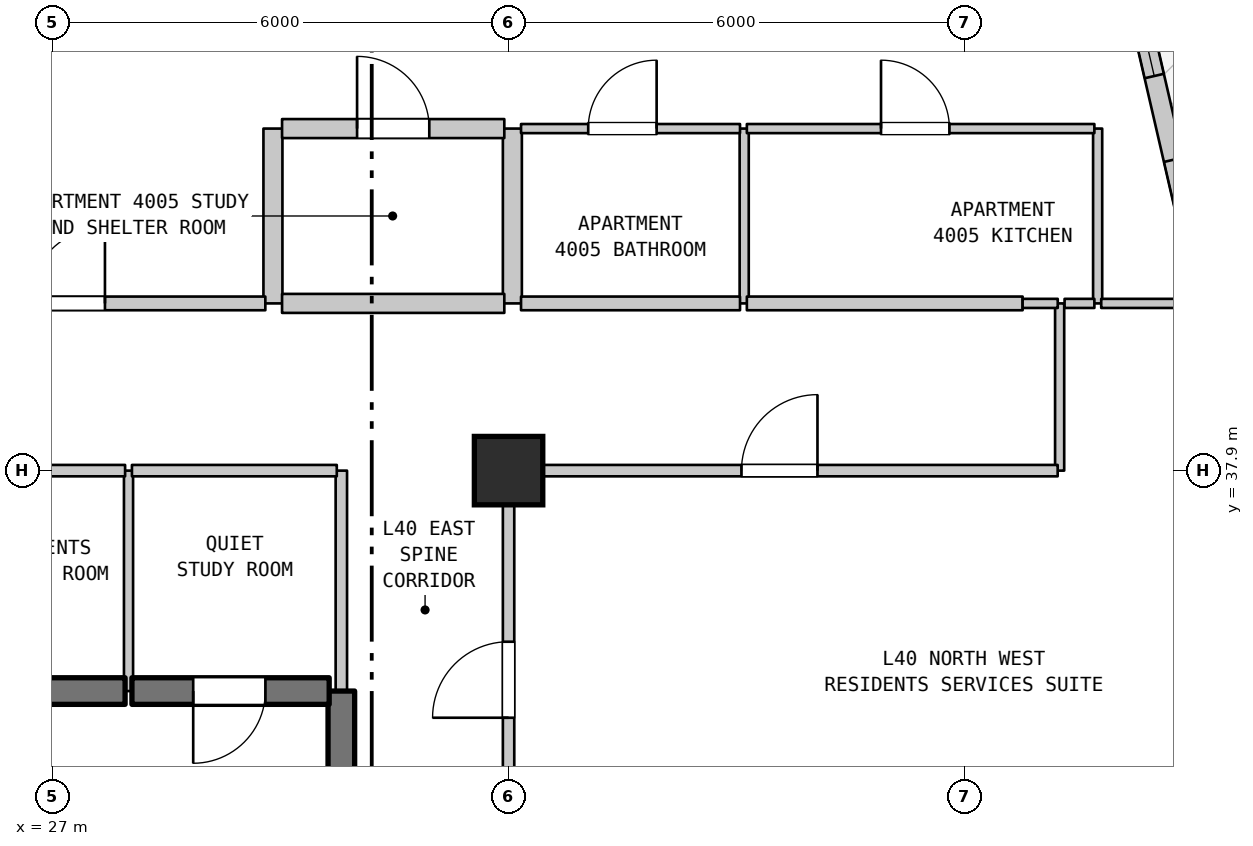
"""IFC4 building model, lengths in metres.
Left out: names, types, materials, properties, quantities, classifications, styles, units other than length and angle.
Written with IfcOpenShell. Run it as: python <this file> out.ifc"""

import sys

from ifc_helpers import new_model, si_unit, direction, frame, frame_2d, origin, origin_2d, place, context, subcontext, project, spatial, rectangle, extrude, element, fill, save


model = new_model("IFC4")
c1 = context("Model", 3, precision=1e-05, world=origin(), true_north=direction((0.0, 1.0)))
c2 = subcontext(c1, "Body", "Model", "MODEL_VIEW")
j1 = project(units=[si_unit("LENGTHUNIT", "METRE"), si_unit("PLANEANGLEUNIT", "RADIAN")], contexts=[c1])
p1 = place(None, origin())
s1 = spatial("IfcSite", under=j1, at=p1, CompositionType="ELEMENT")
p2 = place(p1, origin())
s2 = spatial("IfcBuilding", under=s1, at=p2, CompositionType="ELEMENT")
p3 = place(p2, frame((0.0, 0.0, 164.6)))
s3 = spatial("IfcBuildingStorey", under=s2, at=p3, CompositionType="ELEMENT", Elevation=164.6)
p4 = place(p3, frame((33.0, 37.9, 0.0), z_axis=(0.0, 0.0, 1.0), x_axis=(1.0, 0.0, 0.0)))
e1 = element("IfcColumn", 1, at=p4, inside=s3, PredefinedType="COLUMN", context=c2, shape_type="SweptSolid", body=[
    extrude(rectangle(XDim=0.9, YDim=0.9, at=origin_2d()), origin(), (0.0, 0.0, 1.0), 4.5),
])
p5 = place(p3, frame((39.358, 52.35, 0.0), z_axis=(0.0, 0.0, 1.0), x_axis=(0.224849558511, -0.974393491377, 0.0)))
e2 = element("IfcWall", 2, at=p5, inside=s3, PredefinedType="STANDARD", context=c2, shape_type="SweptSolid", body=[
    extrude(rectangle(XDim=25.093, YDim=0.26, at=frame_2d((12.546, 0.0))), origin(), (0.0, 0.0, 1.0), 4.19),
])
p6 = place(p5, frame((16.689, 0.0, 0.0)))
e3 = element("IfcOpeningElement", 3, at=p6, cuts=e2, PredefinedType="OPENING", context=c2, shape_type="SweptSolid", body=[
    extrude(rectangle(XDim=1.4, YDim=2.2, at=frame_2d((0.7, 1.1))), frame((0.0, 0.14, 0.0), z_axis=(0.0, -1.0, 0.0), x_axis=(1.0, 0.0, 0.0)), (0.0, 0.0, 1.0), 0.28),
])
p7 = place(p5, frame((0.915, 0.0, 0.9)))
e4 = element("IfcOpeningElement", 4, at=p7, cuts=e2, PredefinedType="OPENING", context=c2, shape_type="SweptSolid", body=[
    extrude(rectangle(XDim=1.4, YDim=1.85, at=frame_2d((0.7, 0.925))), frame((0.0, 0.14, 0.0), z_axis=(0.0, -1.0, 0.0), x_axis=(1.0, 0.0, 0.0)), (0.0, 0.0, 1.0), 0.28),
])
p8 = place(p5, frame((3.344, 0.0, 0.9)))
e5 = element("IfcOpeningElement", 5, at=p8, cuts=e2, PredefinedType="OPENING", context=c2, shape_type="SweptSolid", body=[
    extrude(rectangle(XDim=1.3, YDim=1.9, at=frame_2d((0.65, 0.95))), frame((0.0, 0.14, 0.0), z_axis=(0.0, -1.0, 0.0), x_axis=(1.0, 0.0, 0.0)), (0.0, 0.0, 1.0), 0.28),
])
p9 = place(p5, frame((5.323, 0.0, 0.9)))
e6 = element("IfcOpeningElement", 6, at=p9, cuts=e2, PredefinedType="OPENING", context=c2, shape_type="SweptSolid", body=[
    extrude(rectangle(XDim=1.4, YDim=1.85, at=frame_2d((0.7, 0.925))), frame((0.0, 0.14, 0.0), z_axis=(0.0, -1.0, 0.0), x_axis=(1.0, 0.0, 0.0)), (0.0, 0.0, 1.0), 0.28),
])
p10 = place(p5, frame((8.202, 0.0, 0.9)))
e7 = element("IfcOpeningElement", 7, at=p10, cuts=e2, PredefinedType="OPENING", context=c2, shape_type="SweptSolid", body=[
    extrude(rectangle(XDim=1.3, YDim=1.9, at=frame_2d((0.65, 0.95))), frame((0.0, 0.14, 0.0), z_axis=(0.0, -1.0, 0.0), x_axis=(1.0, 0.0, 0.0)), (0.0, 0.0, 1.0), 0.28),
])
p11 = place(p5, frame((10.632, 0.0, 0.9)))
e8 = element("IfcOpeningElement", 8, at=p11, cuts=e2, PredefinedType="OPENING", context=c2, shape_type="SweptSolid", body=[
    extrude(rectangle(XDim=1.4, YDim=1.85, at=frame_2d((0.7, 0.925))), frame((0.0, 0.14, 0.0), z_axis=(0.0, -1.0, 0.0), x_axis=(1.0, 0.0, 0.0)), (0.0, 0.0, 1.0), 0.28),
])
p12 = place(p5, frame((13.061, 0.0, 0.9)))
e9 = element("IfcOpeningElement", 9, at=p12, cuts=e2, PredefinedType="OPENING", context=c2, shape_type="SweptSolid", body=[
    extrude(rectangle(XDim=1.3, YDim=1.9, at=frame_2d((0.65, 0.95))), frame((0.0, 0.14, 0.0), z_axis=(0.0, -1.0, 0.0), x_axis=(1.0, 0.0, 0.0)), (0.0, 0.0, 1.0), 0.28),
])
p13 = place(p5, frame((18.369, 0.0, 0.9)))
e10 = element("IfcOpeningElement", 10, at=p13, cuts=e2, PredefinedType="OPENING", context=c2, shape_type="SweptSolid", body=[
    extrude(rectangle(XDim=1.4, YDim=1.85, at=frame_2d((0.7, 0.925))), frame((0.0, 0.14, 0.0), z_axis=(0.0, -1.0, 0.0), x_axis=(1.0, 0.0, 0.0)), (0.0, 0.0, 1.0), 0.28),
])
p14 = place(p5, frame((20.799, 0.0, 0.9)))
e11 = element("IfcOpeningElement", 11, at=p14, cuts=e2, PredefinedType="OPENING", context=c2, shape_type="SweptSolid", body=[
    extrude(rectangle(XDim=1.3, YDim=1.9, at=frame_2d((0.65, 0.95))), frame((0.0, 0.14, 0.0), z_axis=(0.0, -1.0, 0.0), x_axis=(1.0, 0.0, 0.0)), (0.0, 0.0, 1.0), 0.28),
])
p15 = place(p3, frame((28.0, 35.0, 0.0), z_axis=(0.0, 0.0, 1.0), x_axis=(0.0, 1.0, 0.0)))
e12 = element("IfcWall", 12, at=p15, inside=s3, PredefinedType="PARTITIONING", context=c2, shape_type="SweptSolid", body=[
    extrude(rectangle(XDim=2.9, YDim=0.12, at=frame_2d((1.45, 0.0))), origin(), (0.0, 0.0, 1.0), 4.19),
])
p16 = place(p3, frame((29.9, 40.1, 0.0), z_axis=(0.0, 0.0, 1.0), x_axis=(0.0, 1.0, 0.0)))
e13 = element("IfcWall", 13, at=p16, inside=s3, PredefinedType="STANDARD", context=c2, shape_type="SweptSolid", body=[
    extrude(rectangle(XDim=2.3, YDim=0.25, at=frame_2d((1.15, 0.0))), origin(), (0.0, 0.0, 1.0), 4.19),
])
p17 = place(p3, frame((30.8, 31.5, 0.0), z_axis=(0.0, 0.0, 1.0), x_axis=(0.0, 1.0, 0.0)))
e14 = element("IfcWall", 14, at=p17, inside=s3, PredefinedType="SHEAR", context=c2, shape_type="SweptSolid", body=[
    extrude(rectangle(XDim=3.5, YDim=0.35, at=frame_2d((1.75, 0.0))), origin(), (0.0, 0.0, 1.0), 4.19),
])
p18 = place(p17, frame((1.15, 0.0, 0.0)))
e15 = element("IfcOpeningElement", 15, at=p18, cuts=e14, PredefinedType="OPENING", context=c2, shape_type="SweptSolid", body=[
    extrude(rectangle(XDim=1.2, YDim=2.2, at=frame_2d((0.6, 1.1))), frame((0.0, 0.185, 0.0), z_axis=(0.0, -1.0, 0.0), x_axis=(1.0, 0.0, 0.0)), (0.0, 0.0, 1.0), 0.37),
])
p19 = place(p3, frame((30.8, 35.0, 0.0), z_axis=(0.0, 0.0, 1.0), x_axis=(0.0, 1.0, 0.0)))
e16 = element("IfcWall", 16, at=p19, inside=s3, PredefinedType="STANDARD", context=c2, shape_type="SweptSolid", body=[
    extrude(rectangle(XDim=2.9, YDim=0.15, at=frame_2d((1.45, 0.0))), origin(), (0.0, 0.0, 1.0), 4.19),
])
p20 = place(p3, frame((33.0, 32.54, 0.0), z_axis=(0.0, 0.0, 1.0), x_axis=(0.0, 1.0, 0.0)))
e17 = element("IfcWall", 17, at=p20, inside=s3, PredefinedType="STANDARD", context=c2, shape_type="SweptSolid", body=[
    extrude(rectangle(XDim=5.36, YDim=0.15, at=frame_2d((2.68, 0.0))), origin(), (0.0, 0.0, 1.0), 3.69),
])
p21 = place(p20, frame((2.109, 0.0, 0.0)))
e18 = element("IfcOpeningElement", 18, at=p21, cuts=e17, PredefinedType="OPENING", context=c2, shape_type="SweptSolid", body=[
    extrude(rectangle(XDim=1.0, YDim=2.15, at=frame_2d((0.5, 1.075))), frame((0.0, 0.085, 0.0), z_axis=(0.0, -1.0, 0.0), x_axis=(1.0, 0.0, 0.0)), (0.0, 0.0, 1.0), 0.17),
])
p22 = place(p3, frame((33.05, 40.1, 0.0), z_axis=(0.0, 0.0, 1.0), x_axis=(0.0, 1.0, 0.0)))
e19 = element("IfcWall", 19, at=p22, inside=s3, PredefinedType="STANDARD", context=c2, shape_type="SweptSolid", body=[
    extrude(rectangle(XDim=2.3, YDim=0.25, at=frame_2d((1.15, 0.0))), origin(), (0.0, 0.0, 1.0), 3.59),
])
p23 = place(p3, frame((36.1, 40.1, 0.0), z_axis=(0.0, 0.0, 1.0), x_axis=(0.0, 1.0, 0.0)))
e20 = element("IfcWall", 20, at=p23, inside=s3, PredefinedType="PARTITIONING", context=c2, shape_type="SweptSolid", body=[
    extrude(rectangle(XDim=2.3, YDim=0.12, at=frame_2d((1.15, 0.0))), origin(), (0.0, 0.0, 1.0), 4.19),
])
p24 = place(p3, frame((40.25, 37.9, 0.0), z_axis=(0.0, 0.0, 1.0), x_axis=(0.0, 1.0, 0.0)))
e21 = element("IfcWall", 21, at=p24, inside=s3, PredefinedType="PARTITIONING", context=c2, shape_type="SweptSolid", body=[
    extrude(rectangle(XDim=2.2, YDim=0.12, at=frame_2d((1.1, 0.0))), origin(), (0.0, 0.0, 1.0), 4.19),
])
p25 = place(p3, frame((40.75, 40.1, 0.0), z_axis=(0.0, 0.0, 1.0), x_axis=(0.0, 1.0, 0.0)))
e22 = element("IfcWall", 22, at=p25, inside=s3, PredefinedType="PARTITIONING", context=c2, shape_type="SweptSolid", body=[
    extrude(rectangle(XDim=2.3, YDim=0.12, at=frame_2d((1.15, 0.0))), origin(), (0.0, 0.0, 1.0), 4.19),
])
p26 = place(p3, frame((23.96, 35.0, 0.0), z_axis=(0.0, 0.0, 1.0), x_axis=(1.0, 0.0, 0.0)))
e23 = element("IfcWall", 23, at=p26, inside=s3, PredefinedType="SHEAR", context=c2, shape_type="SweptSolid", body=[
    extrude(rectangle(XDim=3.995, YDim=0.35, at=frame_2d((1.998, 0.0))), origin(), (0.0, 0.0, 1.0), 4.19),
])
p27 = place(p26, frame((1.393, 0.0, 0.0)))
e24 = element("IfcOpeningElement", 24, at=p27, cuts=e23, PredefinedType="OPENING", context=c2, shape_type="SweptSolid", body=[
    extrude(rectangle(XDim=0.95, YDim=2.15, at=frame_2d((0.475, 1.075))), frame((0.0, 0.185, 0.0), z_axis=(0.0, -1.0, 0.0), x_axis=(1.0, 0.0, 0.0)), (0.0, 0.0, 1.0), 0.37),
])
p28 = place(p3, frame((28.045, 35.0, 0.0), z_axis=(0.0, 0.0, 1.0), x_axis=(1.0, 0.0, 0.0)))
e25 = element("IfcWall", 25, at=p28, inside=s3, PredefinedType="SHEAR", context=c2, shape_type="SweptSolid", body=[
    extrude(rectangle(XDim=2.595, YDim=0.35, at=frame_2d((1.297, 0.0))), origin(), (0.0, 0.0, 1.0), 4.19),
])
p29 = place(p28, frame((0.806, 0.0, 0.0)))
e26 = element("IfcOpeningElement", 26, at=p29, cuts=e25, PredefinedType="OPENING", context=c2, shape_type="SweptSolid", body=[
    extrude(rectangle(XDim=0.95, YDim=2.15, at=frame_2d((0.475, 1.075))), frame((0.0, 0.185, 0.0), z_axis=(0.0, -1.0, 0.0), x_axis=(1.0, 0.0, 0.0)), (0.0, 0.0, 1.0), 0.37),
])
p30 = place(p3, frame((23.96, 37.9, 0.0), z_axis=(0.0, 0.0, 1.0), x_axis=(1.0, 0.0, 0.0)))
e27 = element("IfcWall", 27, at=p30, inside=s3, PredefinedType="STANDARD", context=c2, shape_type="SweptSolid", body=[
    extrude(rectangle(XDim=3.995, YDim=0.15, at=frame_2d((1.998, 0.0))), origin(), (0.0, 0.0, 1.0), 3.69),
])
p31 = place(p3, frame((28.045, 37.9, 0.0), z_axis=(0.0, 0.0, 1.0), x_axis=(1.0, 0.0, 0.0)))
e28 = element("IfcWall", 28, at=p31, inside=s3, PredefinedType="STANDARD", context=c2, shape_type="SweptSolid", body=[
    extrude(rectangle(XDim=2.695, YDim=0.15, at=frame_2d((1.348, 0.0))), origin(), (0.0, 0.0, 1.0), 3.69),
])
p32 = place(p3, frame((33.06, 37.9, 0.0), z_axis=(0.0, 0.0, 1.0), x_axis=(1.0, 0.0, 0.0)))
e29 = element("IfcWall", 29, at=p32, inside=s3, PredefinedType="STANDARD", context=c2, shape_type="SweptSolid", body=[
    extrude(rectangle(XDim=7.164, YDim=0.15, at=frame_2d((3.582, 0.0))), origin(), (0.0, 0.0, 1.0), 4.19),
])
p33 = place(p32, frame((3.004, 0.0, 0.0)))
e30 = element("IfcOpeningElement", 30, at=p33, cuts=e29, PredefinedType="OPENING", context=c2, shape_type="SweptSolid", body=[
    extrude(rectangle(XDim=1.0, YDim=2.15, at=frame_2d((0.5, 1.075))), frame((0.0, 0.085, 0.0), z_axis=(0.0, -1.0, 0.0), x_axis=(1.0, 0.0, 0.0)), (0.0, 0.0, 1.0), 0.17),
])
p34 = place(p3, frame((19.455, 40.1, 0.0), z_axis=(0.0, 0.0, 1.0), x_axis=(1.0, 0.0, 0.0)))
e31 = element("IfcWall", 31, at=p34, inside=s3, PredefinedType="STANDARD", context=c2, shape_type="SweptSolid", body=[
    extrude(rectangle(XDim=10.345, YDim=0.18, at=frame_2d((5.172, 0.0))), origin(), (0.0, 0.0, 1.0), 4.19),
])
p35 = place(p34, frame((2.035, 0.0, 0.0)))
e32 = element("IfcOpeningElement", 32, at=p35, cuts=e31, PredefinedType="OPENING", context=c2, shape_type="SweptSolid", body=[
    extrude(rectangle(XDim=1.0, YDim=2.15, at=frame_2d((0.5, 1.075))), frame((0.0, 0.1, 0.0), z_axis=(0.0, -1.0, 0.0), x_axis=(1.0, 0.0, 0.0)), (0.0, 0.0, 1.0), 0.2),
])
p36 = place(p34, frame((7.235, 0.0, 0.0)))
e33 = element("IfcOpeningElement", 33, at=p36, cuts=e31, PredefinedType="OPENING", context=c2, shape_type="SweptSolid", body=[
    extrude(rectangle(XDim=1.0, YDim=2.15, at=frame_2d((0.5, 1.075))), frame((0.0, 0.1, 0.0), z_axis=(0.0, -1.0, 0.0), x_axis=(1.0, 0.0, 0.0)), (0.0, 0.0, 1.0), 0.2),
])
p37 = place(p3, frame((30.02, 40.1, 0.0), z_axis=(0.0, 0.0, 1.0), x_axis=(1.0, 0.0, 0.0)))
e34 = element("IfcWall", 34, at=p37, inside=s3, PredefinedType="STANDARD", context=c2, shape_type="SweptSolid", body=[
    extrude(rectangle(XDim=2.924, YDim=0.25, at=frame_2d((1.462, 0.0))), origin(), (0.0, 0.0, 1.0), 4.19),
])
p38 = place(p3, frame((33.164, 40.1, 0.0), z_axis=(0.0, 0.0, 1.0), x_axis=(1.0, 0.0, 0.0)))
e35 = element("IfcWall", 35, at=p38, inside=s3, PredefinedType="STANDARD", context=c2, shape_type="SweptSolid", body=[
    extrude(rectangle(XDim=2.881, YDim=0.18, at=frame_2d((1.44, 0.0))), origin(), (0.0, 0.0, 1.0), 4.19),
])
p39 = place(p3, frame((36.135, 40.1, 0.0), z_axis=(0.0, 0.0, 1.0), x_axis=(1.0, 0.0, 0.0)))
e36 = element("IfcWall", 36, at=p39, inside=s3, PredefinedType="STANDARD", context=c2, shape_type="SweptSolid", body=[
    extrude(rectangle(XDim=3.628, YDim=0.18, at=frame_2d((1.814, 0.0))), origin(), (0.0, 0.0, 1.0), 4.19),
])
p40 = place(p3, frame((39.763, 40.1, 0.0), z_axis=(0.0, 0.0, 1.0), x_axis=(1.0, 0.0, 0.0)))
e37 = element("IfcWall", 37, at=p40, inside=s3, PredefinedType="PARTITIONING", context=c2, shape_type="SweptSolid", body=[
    extrude(rectangle(XDim=0.462, YDim=0.12, at=frame_2d((0.231, 0.0))), origin(), (0.0, 0.0, 1.0), 4.19),
])
p41 = place(p3, frame((40.315, 40.1, 0.0), z_axis=(0.0, 0.0, 1.0), x_axis=(1.0, 0.0, 0.0)))
e38 = element("IfcWall", 38, at=p41, inside=s3, PredefinedType="PARTITIONING", context=c2, shape_type="SweptSolid", body=[
    extrude(rectangle(XDim=0.392, YDim=0.12, at=frame_2d((0.196, 0.0))), origin(), (0.0, 0.0, 1.0), 4.19),
])
p42 = place(p3, frame((40.797, 40.1, 0.0), z_axis=(0.0, 0.0, 1.0), x_axis=(1.0, 0.0, 0.0)))
e39 = element("IfcWall", 39, at=p42, inside=s3, PredefinedType="PARTITIONING", context=c2, shape_type="SweptSolid", body=[
    extrude(rectangle(XDim=1.378, YDim=0.12, at=frame_2d((0.689, 0.0))), origin(), (0.0, 0.0, 1.0), 4.19),
])
p43 = place(p3, frame((30.02, 42.4, 0.0), z_axis=(0.0, 0.0, 1.0), x_axis=(1.0, 0.0, 0.0)))
e40 = element("IfcWall", 40, at=p43, inside=s3, PredefinedType="STANDARD", context=c2, shape_type="SweptSolid", body=[
    extrude(rectangle(XDim=2.924, YDim=0.25, at=frame_2d((1.462, 0.0))), origin(), (0.0, 0.0, 1.0), 4.19),
])
p44 = place(p43, frame((0.987, 0.0, 0.0)))
e41 = element("IfcOpeningElement", 41, at=p44, cuts=e40, PredefinedType="OPENING", context=c2, shape_type="SweptSolid", body=[
    extrude(rectangle(XDim=0.95, YDim=2.15, at=frame_2d((0.475, 1.075))), frame((0.0, 0.135, 0.0), z_axis=(0.0, -1.0, 0.0), x_axis=(1.0, 0.0, 0.0)), (0.0, 0.0, 1.0), 0.27),
])
p45 = place(p3, frame((33.164, 42.4, 0.0), z_axis=(0.0, 0.0, 1.0), x_axis=(1.0, 0.0, 0.0)))
e42 = element("IfcWall", 42, at=p45, inside=s3, PredefinedType="PARTITIONING", context=c2, shape_type="SweptSolid", body=[
    extrude(rectangle(XDim=2.881, YDim=0.12, at=frame_2d((1.44, 0.0))), origin(), (0.0, 0.0, 1.0), 4.19),
])
p46 = place(p45, frame((0.884, 0.0, 0.0)))
e43 = element("IfcOpeningElement", 43, at=p46, cuts=e42, PredefinedType="OPENING", context=c2, shape_type="SweptSolid", body=[
    extrude(rectangle(XDim=0.9, YDim=2.1, at=frame_2d((0.45, 1.05))), frame((0.0, 0.07, 0.0), z_axis=(0.0, -1.0, 0.0), x_axis=(1.0, 0.0, 0.0)), (0.0, 0.0, 1.0), 0.14),
])
p47 = place(p3, frame((36.135, 42.4, 0.0), z_axis=(0.0, 0.0, 1.0), x_axis=(1.0, 0.0, 0.0)))
e44 = element("IfcWall", 44, at=p47, inside=s3, PredefinedType="PARTITIONING", context=c2, shape_type="SweptSolid", body=[
    extrude(rectangle(XDim=4.572, YDim=0.12, at=frame_2d((2.286, 0.0))), origin(), (0.0, 0.0, 1.0), 4.19),
])
p48 = place(p47, frame((1.765, 0.0, 0.0)))
e45 = element("IfcOpeningElement", 45, at=p48, cuts=e44, PredefinedType="OPENING", context=c2, shape_type="SweptSolid", body=[
    extrude(rectangle(XDim=0.9, YDim=2.15, at=frame_2d((0.45, 1.075))), frame((0.0, 0.07, 0.0), z_axis=(0.0, -1.0, 0.0), x_axis=(1.0, 0.0, 0.0)), (0.0, 0.0, 1.0), 0.14),
])
p49 = place(p10, origin())
e46 = element("IfcWindow", 46, at=p49, inside=s3, PartitioningType="SINGLE_PANEL", PredefinedType="WINDOW", context=c2, shape_type="SweptSolid", body=[
    extrude(rectangle(XDim=1.3, YDim=1.9, at=frame_2d((0.65, 0.95))), frame((0.0, 0.03, 0.0), z_axis=(0.0, -1.0, 0.0), x_axis=(1.0, 0.0, 0.0)), (0.0, 0.0, 1.0), 0.06),
])
fill(e7, e46)
p50 = place(p11, origin())
e47 = element("IfcWindow", 47, at=p50, inside=s3, PartitioningType="SINGLE_PANEL", PredefinedType="WINDOW", context=c2, shape_type="SweptSolid", body=[
    extrude(rectangle(XDim=1.4, YDim=1.85, at=frame_2d((0.7, 0.925))), frame((0.0, 0.03, 0.0), z_axis=(0.0, -1.0, 0.0), x_axis=(1.0, 0.0, 0.0)), (0.0, 0.0, 1.0), 0.06),
])
fill(e8, e47)
p51 = place(p21, origin())
e48 = element("IfcDoor", 48, at=p51, inside=s3, OperationType="SINGLE_SWING_LEFT", PredefinedType="DOOR", context=c2, shape_type="SweptSolid", body=[
    extrude(rectangle(XDim=1.0, YDim=2.15, at=frame_2d((0.5, 1.075))), frame((0.0, 0.025, 0.0), z_axis=(0.0, -1.0, 0.0), x_axis=(1.0, 0.0, 0.0)), (0.0, 0.0, 1.0), 0.05),
])
fill(e18, e48)
p52 = place(p29, frame((0.95, 0.0, 0.0), z_axis=(0.0, 0.0, 1.0), x_axis=(-1.0, 0.0, 0.0)))
e49 = element("IfcDoor", 49, at=p52, inside=s3, OperationType="SINGLE_SWING_LEFT", PredefinedType="DOOR", context=c2, shape_type="SweptSolid", body=[
    extrude(rectangle(XDim=0.95, YDim=2.15, at=frame_2d((0.475, 1.075))), frame((0.0, 0.025, 0.0), z_axis=(0.0, -1.0, 0.0), x_axis=(1.0, 0.0, 0.0)), (0.0, 0.0, 1.0), 0.05),
])
fill(e26, e49)
p53 = place(p33, origin())
e50 = element("IfcDoor", 50, at=p53, inside=s3, OperationType="SINGLE_SWING_RIGHT", PredefinedType="DOOR", context=c2, shape_type="SweptSolid", body=[
    extrude(rectangle(XDim=1.0, YDim=2.15, at=frame_2d((0.5, 1.075))), frame((0.0, 0.025, 0.0), z_axis=(0.0, -1.0, 0.0), x_axis=(1.0, 0.0, 0.0)), (0.0, 0.0, 1.0), 0.05),
])
fill(e30, e50)
p54 = place(p36, origin())
e51 = element("IfcDoor", 51, at=p54, inside=s3, OperationType="SINGLE_SWING_RIGHT", PredefinedType="DOOR", context=c2, shape_type="SweptSolid", body=[
    extrude(rectangle(XDim=1.0, YDim=2.15, at=frame_2d((0.5, 1.075))), frame((0.0, 0.025, 0.0), z_axis=(0.0, -1.0, 0.0), x_axis=(1.0, 0.0, 0.0)), (0.0, 0.0, 1.0), 0.05),
])
fill(e33, e51)
p55 = place(p44, origin())
e52 = element("IfcDoor", 52, at=p55, inside=s3, OperationType="SINGLE_SWING_LEFT", PredefinedType="DOOR", context=c2, shape_type="SweptSolid", body=[
    extrude(rectangle(XDim=0.95, YDim=2.15, at=frame_2d((0.475, 1.075))), frame((0.0, 0.025, 0.0), z_axis=(0.0, -1.0, 0.0), x_axis=(1.0, 0.0, 0.0)), (0.0, 0.0, 1.0), 0.05),
])
fill(e41, e52)
p56 = place(p46, origin())
e53 = element("IfcDoor", 53, at=p56, inside=s3, OperationType="SINGLE_SWING_RIGHT", PredefinedType="DOOR", context=c2, shape_type="SweptSolid", body=[
    extrude(rectangle(XDim=0.9, YDim=2.1, at=frame_2d((0.45, 1.05))), frame((0.0, 0.025, 0.0), z_axis=(0.0, -1.0, 0.0), x_axis=(1.0, 0.0, 0.0)), (0.0, 0.0, 1.0), 0.05),
])
fill(e43, e53)
p57 = place(p48, origin())
e54 = element("IfcDoor", 54, at=p57, inside=s3, OperationType="SINGLE_SWING_LEFT", PredefinedType="DOOR", context=c2, shape_type="SweptSolid", body=[
    extrude(rectangle(XDim=0.9, YDim=2.15, at=frame_2d((0.45, 1.075))), frame((0.0, 0.025, 0.0), z_axis=(0.0, -1.0, 0.0), x_axis=(1.0, 0.0, 0.0)), (0.0, 0.0, 1.0), 0.05),
])
fill(e45, e54)
save(model, sys.argv[1])
